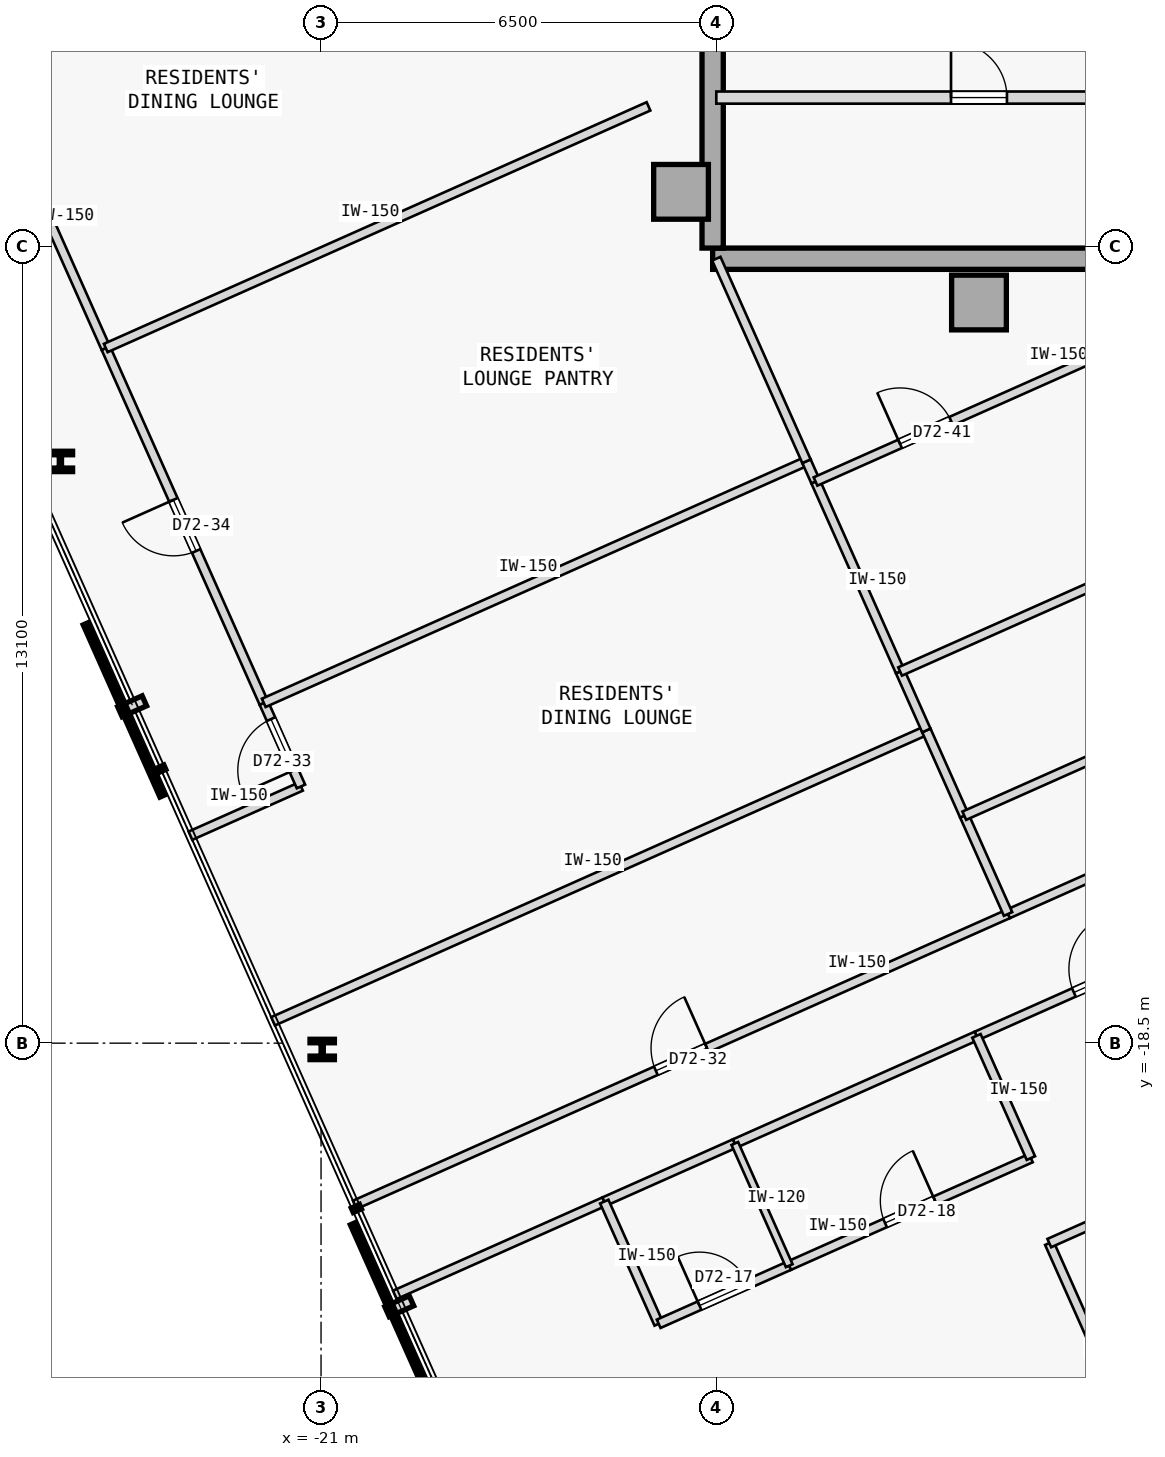
"""IFC4 building model, lengths in metres.
Left out: names, types, materials, properties, quantities, classifications, styles, units other than length and angle.
Written with IfcOpenShell. Run it as: python <this file> out.ifc"""

import sys

from ifc_helpers import new_model, si_unit, direction, frame, frame_2d, origin, origin_2d, place, context, subcontext, project, spatial, rectangle, i_section, extrude, element, fill, save


model = new_model("IFC4")
c1 = context("Model", 3, precision=1e-05, world=origin(), true_north=direction((0.0, 1.0)))
c2 = subcontext(c1, "Body", "Model", "MODEL_VIEW")
j1 = project(units=[si_unit("LENGTHUNIT", "METRE"), si_unit("PLANEANGLEUNIT", "RADIAN")], contexts=[c1])
p1 = place(None, origin())
s1 = spatial("IfcSite", under=j1, at=p1, CompositionType="ELEMENT")
p2 = place(p1, origin())
s2 = spatial("IfcBuilding", under=s1, at=p2, CompositionType="ELEMENT")
p3 = place(p2, frame((0.0, 0.0, 268.9)))
s3 = spatial("IfcBuildingStorey", under=s2, at=p3, CompositionType="ELEMENT", Elevation=268.9)
for number, where, z_axis, x_axis in (
    (1, (-15.08, -4.5, 0.0), (0.0, 0.0, 1.0), (1.0, 0.0, 0.0)),
    (2, (-10.18, -6.32, 0.0), (0.0, 0.0, 1.0), (1.0, 0.0, 0.0)),
):
    element("IfcColumn", number, at=place(p3, frame(where, z_axis=z_axis, x_axis=x_axis)), inside=s3, PredefinedType="COLUMN", context=c2, shape_type="SweptSolid", body=[
        extrude(rectangle(XDim=0.9, YDim=0.9, at=origin_2d()), origin(), (0.0, 0.0, 1.0), 3.35),
    ])
p4 = place(p3, frame((-14.56, -5.6, 0.0), z_axis=(0.0, 0.0, 1.0), x_axis=(1.0, 0.0, 0.0)))
e3 = element("IfcWall", 3, at=p4, inside=s3, PredefinedType="SHEAR", context=c2, shape_type="SweptSolid", body=[
    extrude(rectangle(XDim=10.86, YDim=0.35, at=frame_2d((5.43, 0.0))), origin(), (0.0, 0.0, 1.0), 3.125),
])
p5 = place(p3, frame((-14.56, -5.425, 0.0), z_axis=(0.0, 0.0, 1.0), x_axis=(0.0, 1.0, 0.0)))
e4 = element("IfcWall", 4, at=p5, inside=s3, PredefinedType="SHEAR", context=c2, shape_type="SweptSolid", body=[
    extrude(rectangle(XDim=10.85, YDim=0.35, at=frame_2d((5.425, 0.0))), origin(), (0.0, 0.0, 1.0), 3.125),
])
for number, where, z_axis, x_axis in (
    (5, (-25.286, -8.933, 0.0), (0.0, 0.0, 1.0), (1.0, 0.0, 0.0)),
    (6, (-20.981, -18.603, 0.0), (0.0, 0.0, 1.0), (1.0, 0.0, 0.0)),
):
    element("IfcColumn", number, at=place(p3, frame(where, z_axis=z_axis, x_axis=x_axis)), inside=s3, PredefinedType="COLUMN", context=c2, shape_type="SweptSolid", body=[
        extrude(i_section(OverallWidth=0.401, OverallDepth=0.335, WebThickness=0.036, FlangeThickness=0.058, FilletRadius=0.015, at=origin_2d()), origin(), (0.0, 0.0, 1.0), 3.35),
    ])
p6 = place(p3, frame((-14.5, -2.95, 0.0), z_axis=(0.0, 0.0, 1.0), x_axis=(1.0, 0.0, 0.0)))
e7 = element("IfcWall", 7, at=p6, inside=s3, PredefinedType="STANDARD", context=c2, shape_type="SweptSolid", body=[
    extrude(rectangle(XDim=10.8, YDim=0.2, at=frame_2d((5.4, 0.0))), origin(), (0.0, 0.0, 1.0), 3.125),
])
p7 = place(p6, frame((9.17, 0.0, 0.0)))
e8 = element("IfcOpeningElement", 8, at=p7, cuts=e7, PredefinedType="OPENING", context=c2, shape_type="SweptSolid", body=[
    extrude(rectangle(XDim=1.1, YDim=2.15, at=frame_2d((0.55, 1.075))), frame((0.0, 0.11, 0.0), z_axis=(0.0, -1.0, 0.0), x_axis=(1.0, 0.0, 0.0)), (0.0, 0.0, 1.0), 0.22),
])
p8 = place(p6, frame((3.86, 0.0, 0.0)))
e9 = element("IfcOpeningElement", 9, at=p8, cuts=e7, PredefinedType="OPENING", context=c2, shape_type="SweptSolid", body=[
    extrude(rectangle(XDim=0.92, YDim=2.15, at=frame_2d((0.46, 1.075))), frame((0.0, 0.11, 0.0), z_axis=(0.0, -1.0, 0.0), x_axis=(1.0, 0.0, 0.0)), (0.0, 0.0, 1.0), 0.22),
])
p9 = place(p3, frame((-19.786, -22.639, 0.0), z_axis=(0.0, 0.0, 1.0), x_axis=(0.913541633228, 0.406745232743, 0.0)))
e10 = element("IfcWall", 10, at=p9, inside=s3, PredefinedType="PARTITIONING", context=c2, shape_type="SweptSolid", body=[
    extrude(rectangle(XDim=3.77, YDim=0.15, at=frame_2d((1.885, 0.0))), origin(), (0.0, 0.0, 1.0), 3.125),
])
p10 = place(p3, frame((-10.221, -18.38, 0.0), z_axis=(0.0, 0.0, 1.0), x_axis=(0.913542602601, 0.406743055543, 0.0)))
e11 = element("IfcWall", 11, at=p10, inside=s3, PredefinedType="PARTITIONING", context=c2, shape_type="SweptSolid", body=[
    extrude(rectangle(XDim=4.458, YDim=0.15, at=frame_2d((2.229, 0.0))), origin(), (0.0, 0.0, 1.0), 3.125),
])
p11 = place(p10, frame((1.754, 0.0, 0.0)))
e12 = element("IfcOpeningElement", 12, at=p11, cuts=e11, PredefinedType="OPENING", context=c2, shape_type="SweptSolid", body=[
    extrude(rectangle(XDim=0.95, YDim=2.15, at=frame_2d((0.475, 1.075))), frame((0.0, 0.085, 0.0), z_axis=(0.0, -1.0, 0.0), x_axis=(1.0, 0.0, 0.0)), (0.0, 0.0, 1.0), 0.17),
])
p12 = place(p3, frame((-16.342, -21.105, 0.0), z_axis=(0.0, 0.0, 1.0), x_axis=(0.913558622212, 0.406707073682, 0.0)))
e13 = element("IfcWall", 13, at=p12, inside=s3, PredefinedType="PARTITIONING", context=c2, shape_type="SweptSolid", body=[
    extrude(rectangle(XDim=2.35, YDim=0.15, at=frame_2d((1.175, 0.0))), origin(), (0.0, 0.0, 1.0), 3.125),
])
p13 = place(p3, frame((-14.195, -20.149, 0.0), z_axis=(0.0, 0.0, 1.0), x_axis=(0.913545193015, 0.406737237438, 0.0)))
e14 = element("IfcWall", 14, at=p13, inside=s3, PredefinedType="PARTITIONING", context=c2, shape_type="SweptSolid", body=[
    extrude(rectangle(XDim=4.35, YDim=0.15, at=frame_2d((2.175, 0.0))), origin(), (0.0, 0.0, 1.0), 3.125),
])
p14 = place(p3, frame((-20.445, -21.159, 0.0), z_axis=(0.0, 0.0, 1.0), x_axis=(0.913547681516, 0.406731648137, 0.0)))
e15 = element("IfcWall", 15, at=p14, inside=s3, PredefinedType="PARTITIONING", context=c2, shape_type="SweptSolid", body=[
    extrude(rectangle(XDim=11.76, YDim=0.15, at=frame_2d((5.88, 0.0))), origin(), (0.0, 0.0, 1.0), 3.125),
])
p15 = place(p14, frame((5.42, 0.0, 0.0)))
e16 = element("IfcOpeningElement", 16, at=p15, cuts=e15, PredefinedType="OPENING", context=c2, shape_type="SweptSolid", body=[
    extrude(rectangle(XDim=0.92, YDim=2.15, at=frame_2d((0.46, 1.075))), frame((0.0, 0.085, 0.0), z_axis=(0.0, -1.0, 0.0), x_axis=(1.0, 0.0, 0.0)), (0.0, 0.0, 1.0), 0.17),
])
p16 = place(p3, frame((-23.148, -15.088, 0.0), z_axis=(0.0, 0.0, 1.0), x_axis=(0.913553334727, 0.406718950392, 0.0)))
e17 = element("IfcWall", 17, at=p16, inside=s3, PredefinedType="PARTITIONING", context=c2, shape_type="SweptSolid", body=[
    extrude(rectangle(XDim=1.99, YDim=0.15, at=frame_2d((0.995, 0.0))), origin(), (0.0, 0.0, 1.0), 3.125),
])
p17 = place(p3, frame((-21.33, -14.279, 0.0), z_axis=(0.0, 0.0, 1.0), x_axis=(-0.406725442105, 0.913550444554, 0.0)))
e18 = element("IfcWall", 18, at=p17, inside=s3, PredefinedType="PARTITIONING", context=c2, shape_type="SweptSolid", body=[
    extrude(rectangle(XDim=1.505, YDim=0.15, at=frame_2d((0.752, 0.0))), origin(), (0.0, 0.0, 1.0), 3.125),
])
p18 = place(p17, frame((0.292, 0.0, 0.0)))
e19 = element("IfcOpeningElement", 19, at=p18, cuts=e18, PredefinedType="OPENING", context=c2, shape_type="SweptSolid", body=[
    extrude(rectangle(XDim=0.92, YDim=2.15, at=frame_2d((0.46, 1.075))), frame((0.0, 0.085, 0.0), z_axis=(0.0, -1.0, 0.0), x_axis=(1.0, 0.0, 0.0)), (0.0, 0.0, 1.0), 0.17),
])
p19 = place(p3, frame((-21.942, -12.904, 0.0), z_axis=(0.0, 0.0, 1.0), x_axis=(-0.406712833395, 0.913556058023, 0.0)))
e20 = element("IfcWall", 20, at=p19, inside=s3, PredefinedType="PARTITIONING", context=c2, shape_type="SweptSolid", body=[
    extrude(rectangle(XDim=6.388, YDim=0.15, at=frame_2d((3.194, 0.0))), origin(), (0.0, 0.0, 1.0), 3.125),
])
p20 = place(p19, frame((2.734, 0.0, 0.0)))
e21 = element("IfcOpeningElement", 21, at=p20, cuts=e20, PredefinedType="OPENING", context=c2, shape_type="SweptSolid", body=[
    extrude(rectangle(XDim=0.92, YDim=2.15, at=frame_2d((0.46, 1.075))), frame((0.0, 0.085, 0.0), z_axis=(0.0, -1.0, 0.0), x_axis=(1.0, 0.0, 0.0)), (0.0, 0.0, 1.0), 0.17),
])
p21 = place(p3, frame((-24.54, -7.068, 0.0), z_axis=(0.0, 0.0, 1.0), x_axis=(-0.406758457302, 0.913535745011, 0.0)))
e22 = element("IfcWall", 22, at=p21, inside=s3, PredefinedType="PARTITIONING", context=c2, shape_type="SweptSolid", body=[
    extrude(rectangle(XDim=7.489, YDim=0.15, at=frame_2d((3.744, 0.0))), origin(), (0.0, 0.0, 1.0), 3.125),
])
p22 = place(p3, frame((-9.702, -16.375, 0.0), z_axis=(0.0, 0.0, 1.0), x_axis=(0.913552389019, 0.406721074594, 0.0)))
e23 = element("IfcWall", 23, at=p22, inside=s3, PredefinedType="PARTITIONING", context=c2, shape_type="SweptSolid", body=[
    extrude(rectangle(XDim=6.57, YDim=0.15, at=frame_2d((3.285, 0.0))), origin(), (0.0, 0.0, 1.0), 3.125),
])
p23 = place(p22, frame((2.825, 0.0, 0.0)))
e24 = element("IfcOpeningElement", 24, at=p23, cuts=e23, PredefinedType="OPENING", context=c2, shape_type="SweptSolid", body=[
    extrude(rectangle(XDim=0.92, YDim=2.15, at=frame_2d((0.46, 1.075))), frame((0.0, 0.085, 0.0), z_axis=(0.0, -1.0, 0.0), x_axis=(1.0, 0.0, 0.0)), (0.0, 0.0, 1.0), 0.17),
])
p24 = place(p3, frame((-15.448, -23.115, 0.0), z_axis=(0.0, 0.0, 1.0), x_axis=(-0.406725294076, 0.913550510459, 0.0)))
e25 = element("IfcWall", 25, at=p24, inside=s3, PredefinedType="PARTITIONING", context=c2, shape_type="SweptSolid", body=[
    extrude(rectangle(XDim=2.2, YDim=0.15, at=frame_2d((1.1, 0.0))), origin(), (0.0, 0.0, 1.0), 3.125),
])
p25 = place(p3, frame((-15.448, -23.115, 0.0), z_axis=(0.0, 0.0, 1.0), x_axis=(0.913558622212, 0.406707073682, 0.0)))
e26 = element("IfcWall", 26, at=p25, inside=s3, PredefinedType="PARTITIONING", context=c2, shape_type="SweptSolid", body=[
    extrude(rectangle(XDim=2.35, YDim=0.15, at=frame_2d((1.175, 0.0))), origin(), (0.0, 0.0, 1.0), 3.125),
])
p26 = place(p25, frame((0.735, 0.0, 0.0)))
e27 = element("IfcOpeningElement", 27, at=p26, cuts=e26, PredefinedType="OPENING", context=c2, shape_type="SweptSolid", body=[
    extrude(rectangle(XDim=0.88, YDim=2.15, at=frame_2d((0.44, 1.075))), frame((0.0, 0.085, 0.0), z_axis=(0.0, -1.0, 0.0), x_axis=(1.0, 0.0, 0.0)), (0.0, 0.0, 1.0), 0.17),
])
p27 = place(p3, frame((-13.301, -22.159, 0.0), z_axis=(0.0, 0.0, 1.0), x_axis=(0.913545193015, 0.406737237438, 0.0)))
e28 = element("IfcWall", 28, at=p27, inside=s3, PredefinedType="PARTITIONING", context=c2, shape_type="SweptSolid", body=[
    extrude(rectangle(XDim=4.35, YDim=0.15, at=frame_2d((2.175, 0.0))), origin(), (0.0, 0.0, 1.0), 3.125),
])
p28 = place(p27, frame((1.725, 0.0, 0.0)))
e29 = element("IfcOpeningElement", 29, at=p28, cuts=e28, PredefinedType="OPENING", context=c2, shape_type="SweptSolid", body=[
    extrude(rectangle(XDim=0.9, YDim=2.15, at=frame_2d((0.45, 1.075))), frame((0.0, 0.085, 0.0), z_axis=(0.0, -1.0, 0.0), x_axis=(1.0, 0.0, 0.0)), (0.0, 0.0, 1.0), 0.17),
])
p29 = place(p3, frame((-9.327, -20.39, 0.0), z_axis=(0.0, 0.0, 1.0), x_axis=(-0.406725294076, 0.913550510459, 0.0)))
e30 = element("IfcWall", 30, at=p29, inside=s3, PredefinedType="PARTITIONING", context=c2, shape_type="SweptSolid", body=[
    extrude(rectangle(XDim=2.2, YDim=0.15, at=frame_2d((1.1, 0.0))), origin(), (0.0, 0.0, 1.0), 3.125),
])
p30 = place(p3, frame((-6.61, -27.21, 0.0), z_axis=(0.0, 0.0, 1.0), x_axis=(-0.406699433793, 0.913562023375, 0.0)))
e31 = element("IfcWall", 31, at=p30, inside=s3, PredefinedType="PARTITIONING", context=c2, shape_type="SweptSolid", body=[
    extrude(rectangle(XDim=5.935, YDim=0.15, at=frame_2d((2.968, 0.0))), origin(), (0.0, 0.0, 1.0), 3.125),
])
p31 = place(p30, frame((2.518, 0.0, 0.0)))
e32 = element("IfcOpeningElement", 32, at=p31, cuts=e31, PredefinedType="OPENING", context=c2, shape_type="SweptSolid", body=[
    extrude(rectangle(XDim=0.9, YDim=2.15, at=frame_2d((0.45, 1.075))), frame((0.0, 0.085, 0.0), z_axis=(0.0, -1.0, 0.0), x_axis=(1.0, 0.0, 0.0)), (0.0, 0.0, 1.0), 0.17),
])
p32 = place(p3, frame((-9.024, -21.788, 0.0), z_axis=(0.0, 0.0, 1.0), x_axis=(0.913564558304, 0.406693739576, 0.0)))
e33 = element("IfcWall", 33, at=p32, inside=s3, PredefinedType="PARTITIONING", context=c2, shape_type="SweptSolid", body=[
    extrude(rectangle(XDim=4.65, YDim=0.15, at=frame_2d((2.325, 0.0))), origin(), (0.0, 0.0, 1.0), 3.125),
])
p33 = place(p3, frame((-13.301, -22.159, 0.0), z_axis=(0.0, 0.0, 1.0), x_axis=(-0.406725294076, 0.913550510459, 0.0)))
e34 = element("IfcWall", 34, at=p33, inside=s3, PredefinedType="PARTITIONING", context=c2, shape_type="SweptSolid", body=[
    extrude(rectangle(XDim=2.2, YDim=0.12, at=frame_2d((1.1, 0.0))), origin(), (0.0, 0.0, 1.0), 3.125),
])
p34 = place(p3, frame((-21.789, -18.14, 0.0), z_axis=(0.0, 0.0, 1.0), x_axis=(0.913544247064, 0.406739362069, 0.0)))
e35 = element("IfcWall", 35, at=p34, inside=s3, PredefinedType="PARTITIONING", context=c2, shape_type="SweptSolid", body=[
    extrude(rectangle(XDim=11.76, YDim=0.15, at=frame_2d((5.88, 0.0))), origin(), (0.0, 0.0, 1.0), 3.125),
])
p35 = place(p3, frame((-9.702, -16.375, 0.0), z_axis=(0.0, 0.0, 1.0), x_axis=(-0.406740252054, 0.913543850813, 0.0)))
e36 = element("IfcWall", 36, at=p35, inside=s3, PredefinedType="PARTITIONING", context=c2, shape_type="SweptSolid", body=[
    extrude(rectangle(XDim=1.769, YDim=0.15, at=frame_2d((0.884, 0.0))), origin(), (0.0, 0.0, 1.0), 3.125),
])
p36 = place(p3, frame((-10.421, -14.76, 0.0), z_axis=(0.0, 0.0, 1.0), x_axis=(-0.406817131294, 0.91350961773, 0.0)))
e37 = element("IfcWall", 37, at=p36, inside=s3, PredefinedType="PARTITIONING", context=c2, shape_type="SweptSolid", body=[
    extrude(rectangle(XDim=1.535, YDim=0.15, at=frame_2d((0.768, 0.0))), origin(), (0.0, 0.0, 1.0), 3.125),
])
p37 = place(p3, frame((-21.942, -12.904, 0.0), z_axis=(0.0, 0.0, 1.0), x_axis=(0.913542396088, 0.40674351937, 0.0)))
e38 = element("IfcWall", 38, at=p37, inside=s3, PredefinedType="PARTITIONING", context=c2, shape_type="SweptSolid", body=[
    extrude(rectangle(XDim=9.77, YDim=0.15, at=frame_2d((4.885, 0.0))), origin(), (0.0, 0.0, 1.0), 3.125),
])
p38 = place(p3, frame((-11.046, -13.357, 0.0), z_axis=(0.0, 0.0, 1.0), x_axis=(-0.406629497236, 0.913593154515, 0.0)))
e39 = element("IfcWall", 39, at=p38, inside=s3, PredefinedType="PARTITIONING", context=c2, shape_type="SweptSolid", body=[
    extrude(rectangle(XDim=1.061, YDim=0.15, at=frame_2d((0.53, 0.0))), origin(), (0.0, 0.0, 1.0), 3.125),
])
p39 = place(p3, frame((-11.477, -12.388, 0.0), z_axis=(0.0, 0.0, 1.0), x_axis=(-0.406760980894, 0.913534621359, 0.0)))
e40 = element("IfcWall", 40, at=p39, inside=s3, PredefinedType="PARTITIONING", context=c2, shape_type="SweptSolid", body=[
    extrude(rectangle(XDim=3.42, YDim=0.15, at=frame_2d((1.71, 0.0))), origin(), (0.0, 0.0, 1.0), 3.125),
])
p40 = place(p3, frame((-12.868, -9.264, 0.0), z_axis=(0.0, 0.0, 1.0), x_axis=(-0.406634840409, 0.913590776314, 0.0)))
e41 = element("IfcWall", 41, at=p40, inside=s3, PredefinedType="PARTITIONING", context=c2, shape_type="SweptSolid", body=[
    extrude(rectangle(XDim=0.365, YDim=0.15, at=frame_2d((0.183, 0.0))), origin(), (0.0, 0.0, 1.0), 3.125),
])
p41 = place(p3, frame((-24.54, -7.068, 0.0), z_axis=(0.0, 0.0, 1.0), x_axis=(0.913551681238, 0.406722664364, 0.0)))
e42 = element("IfcWall", 42, at=p41, inside=s3, PredefinedType="PARTITIONING", context=c2, shape_type="SweptSolid", body=[
    extrude(rectangle(XDim=9.77, YDim=0.15, at=frame_2d((4.885, 0.0))), origin(), (0.0, 0.0, 1.0), 3.125),
])
p42 = place(p3, frame((-13.017, -8.93, 0.0), z_axis=(0.0, 0.0, 1.0), x_axis=(-0.406722395322, 0.913551801018, 0.0)))
e43 = element("IfcWall", 43, at=p42, inside=s3, PredefinedType="PARTITIONING", context=c2, shape_type="SweptSolid", body=[
    extrude(rectangle(XDim=3.646, YDim=0.15, at=frame_2d((1.823, 0.0))), origin(), (0.0, 0.0, 1.0), 3.125),
])
p43 = place(p3, frame((-10.421, -14.76, 0.0), z_axis=(0.0, 0.0, 1.0), x_axis=(0.913533574053, 0.406763333006, 0.0)))
e44 = element("IfcWall", 44, at=p43, inside=s3, PredefinedType="PARTITIONING", context=c2, shape_type="SweptSolid", body=[
    extrude(rectangle(XDim=7.358, YDim=0.15, at=frame_2d((3.679, 0.0))), origin(), (0.0, 0.0, 1.0), 3.125),
])
p44 = place(p3, frame((-11.477, -12.388, 0.0), z_axis=(0.0, 0.0, 1.0), x_axis=(0.913542897736, 0.406742392673, 0.0)))
e45 = element("IfcWall", 45, at=p44, inside=s3, PredefinedType="PARTITIONING", context=c2, shape_type="SweptSolid", body=[
    extrude(rectangle(XDim=8.513, YDim=0.15, at=frame_2d((4.257, 0.0))), origin(), (0.0, 0.0, 1.0), 3.125),
])
p45 = place(p3, frame((-12.868, -9.264, 0.0), z_axis=(0.0, 0.0, 1.0), x_axis=(0.913545332854, 0.406736923356, 0.0)))
e46 = element("IfcWall", 46, at=p45, inside=s3, PredefinedType="PARTITIONING", context=c2, shape_type="SweptSolid", body=[
    extrude(rectangle(XDim=9.007, YDim=0.15, at=frame_2d((4.504, 0.0))), origin(), (0.0, 0.0, 1.0), 3.125),
])
p46 = place(p45, frame((1.521, 0.0, 0.0)))
e47 = element("IfcOpeningElement", 47, at=p46, cuts=e46, PredefinedType="OPENING", context=c2, shape_type="SweptSolid", body=[
    extrude(rectangle(XDim=0.92, YDim=2.15, at=frame_2d((0.46, 1.075))), frame((0.0, 0.085, 0.0), z_axis=(0.0, -1.0, 0.0), x_axis=(1.0, 0.0, 0.0)), (0.0, 0.0, 1.0), 0.17),
])
p47 = place(p8, origin())
e48 = element("IfcDoor", 48, at=p47, inside=s3, OperationType="SINGLE_SWING_LEFT", PredefinedType="DOOR", context=c2, shape_type="SweptSolid", body=[
    extrude(rectangle(XDim=0.92, YDim=2.15, at=frame_2d((0.46, 1.075))), frame((0.0, 0.025, 0.0), z_axis=(0.0, -1.0, 0.0), x_axis=(1.0, 0.0, 0.0)), (0.0, 0.0, 1.0), 0.05),
])
fill(e9, e48)
p48 = place(p11, origin())
e49 = element("IfcDoor", 49, at=p48, inside=s3, OperationType="SINGLE_SWING_RIGHT", PredefinedType="DOOR", context=c2, shape_type="SweptSolid", body=[
    extrude(rectangle(XDim=0.95, YDim=2.15, at=frame_2d((0.475, 1.075))), frame((0.0, 0.025, 0.0), z_axis=(0.0, -1.0, 0.0), x_axis=(1.0, 0.0, 0.0)), (0.0, 0.0, 1.0), 0.05),
])
fill(e12, e49)
p49 = place(p26, origin())
e50 = element("IfcDoor", 50, at=p49, inside=s3, OperationType="SINGLE_SWING_LEFT", PredefinedType="DOOR", context=c2, shape_type="SweptSolid", body=[
    extrude(rectangle(XDim=0.88, YDim=2.15, at=frame_2d((0.44, 1.075))), frame((0.0, 0.025, 0.0), z_axis=(0.0, -1.0, 0.0), x_axis=(1.0, 0.0, 0.0)), (0.0, 0.0, 1.0), 0.05),
])
fill(e27, e50)
p50 = place(p28, origin())
e51 = element("IfcDoor", 51, at=p50, inside=s3, OperationType="SINGLE_SWING_RIGHT", PredefinedType="DOOR", context=c2, shape_type="SweptSolid", body=[
    extrude(rectangle(XDim=0.9, YDim=2.15, at=frame_2d((0.45, 1.075))), frame((0.0, 0.025, 0.0), z_axis=(0.0, -1.0, 0.0), x_axis=(1.0, 0.0, 0.0)), (0.0, 0.0, 1.0), 0.05),
])
fill(e29, e51)
p51 = place(p15, origin())
e52 = element("IfcDoor", 52, at=p51, inside=s3, OperationType="SINGLE_SWING_RIGHT", PredefinedType="DOOR", context=c2, shape_type="SweptSolid", body=[
    extrude(rectangle(XDim=0.92, YDim=2.15, at=frame_2d((0.46, 1.075))), frame((0.0, 0.025, 0.0), z_axis=(0.0, -1.0, 0.0), x_axis=(1.0, 0.0, 0.0)), (0.0, 0.0, 1.0), 0.05),
])
fill(e16, e52)
p52 = place(p18, origin())
e53 = element("IfcDoor", 53, at=p52, inside=s3, OperationType="SINGLE_SWING_LEFT", PredefinedType="DOOR", context=c2, shape_type="SweptSolid", body=[
    extrude(rectangle(XDim=0.92, YDim=2.15, at=frame_2d((0.46, 1.075))), frame((0.0, 0.025, 0.0), z_axis=(0.0, -1.0, 0.0), x_axis=(1.0, 0.0, 0.0)), (0.0, 0.0, 1.0), 0.05),
])
fill(e19, e53)
p53 = place(p20, origin())
e54 = element("IfcDoor", 54, at=p53, inside=s3, OperationType="SINGLE_SWING_RIGHT", PredefinedType="DOOR", context=c2, shape_type="SweptSolid", body=[
    extrude(rectangle(XDim=0.92, YDim=2.15, at=frame_2d((0.46, 1.075))), frame((0.0, 0.025, 0.0), z_axis=(0.0, -1.0, 0.0), x_axis=(1.0, 0.0, 0.0)), (0.0, 0.0, 1.0), 0.05),
])
fill(e21, e54)
p54 = place(p46, origin())
e55 = element("IfcDoor", 55, at=p54, inside=s3, OperationType="SINGLE_SWING_LEFT", PredefinedType="DOOR", context=c2, shape_type="SweptSolid", body=[
    extrude(rectangle(XDim=0.92, YDim=2.15, at=frame_2d((0.46, 1.075))), frame((0.0, 0.025, 0.0), z_axis=(0.0, -1.0, 0.0), x_axis=(1.0, 0.0, 0.0)), (0.0, 0.0, 1.0), 0.05),
])
fill(e47, e55)
save(model, sys.argv[1])
